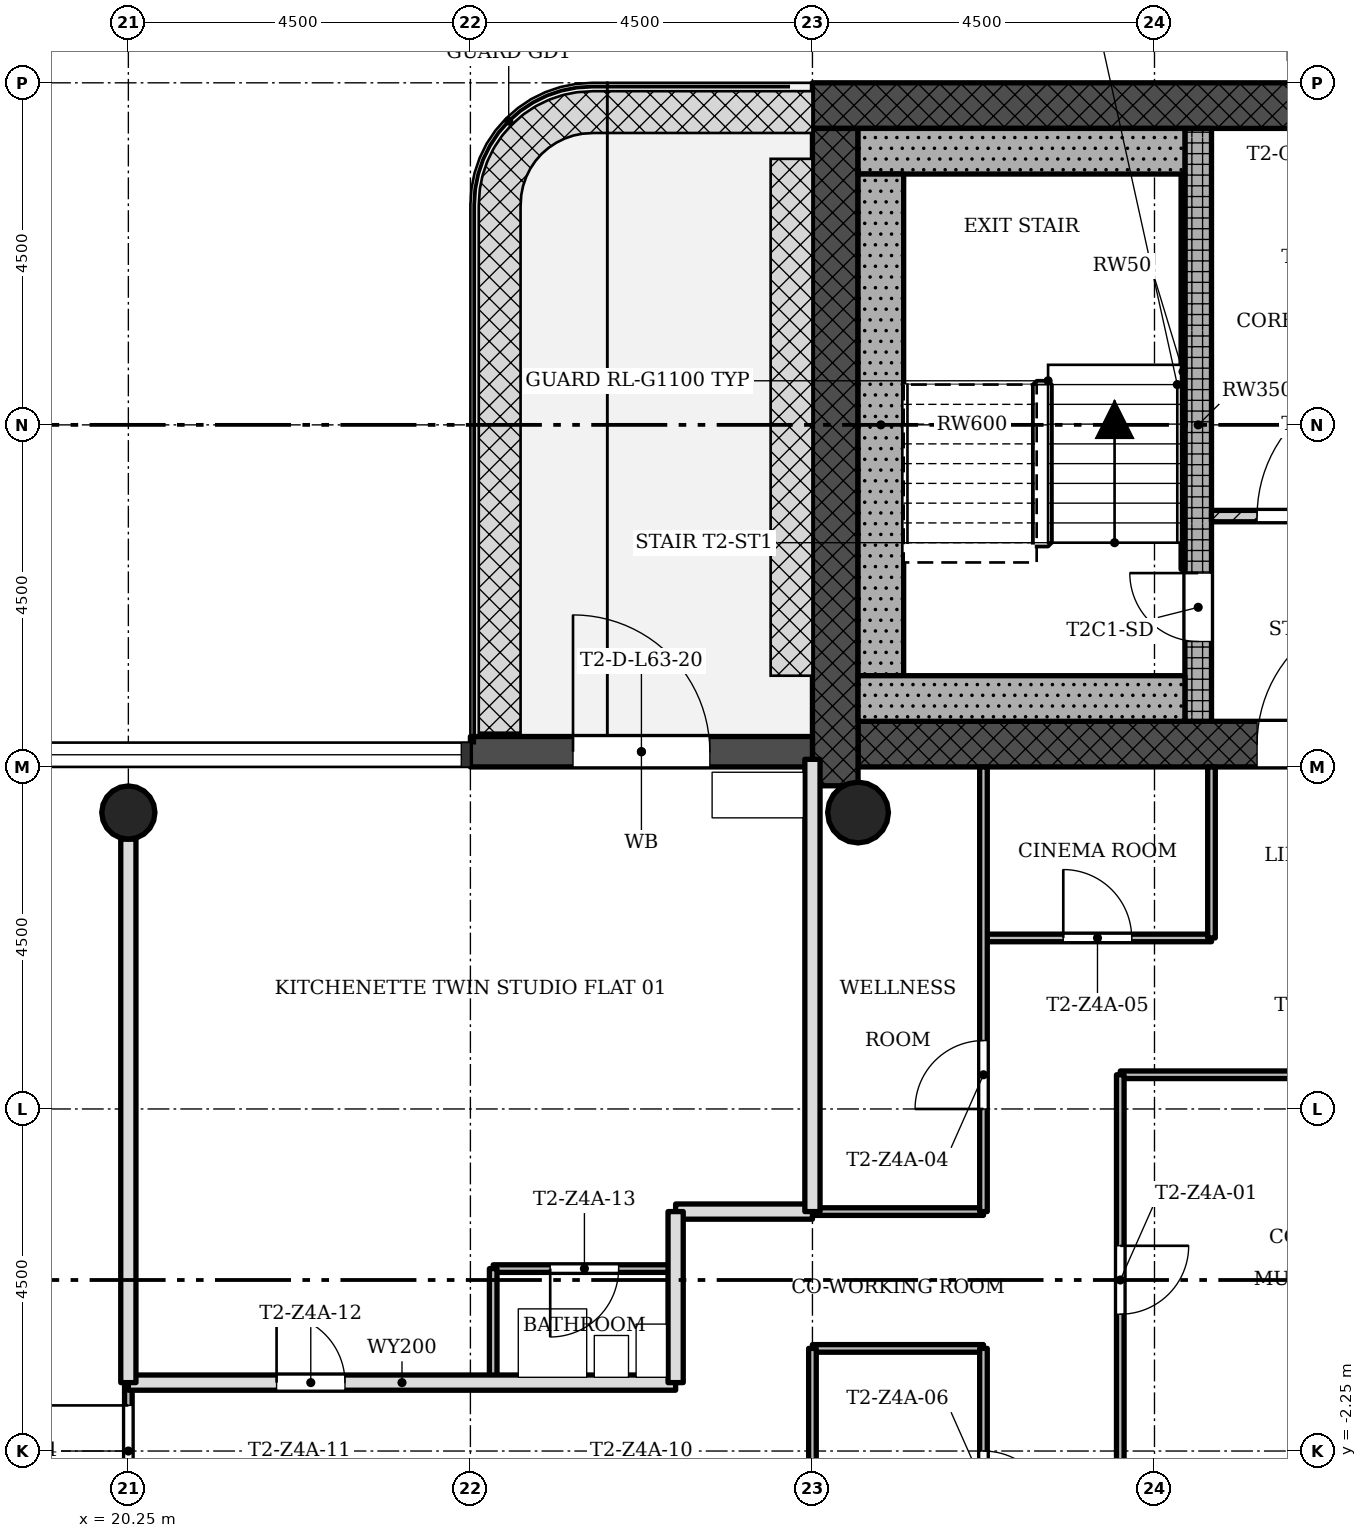
"""IFC4 building model, lengths in metres.
Left out: names, types, materials, properties, quantities, classifications, styles, units other than length and angle.
Written with IfcOpenShell. Run it as: python <this file> out.ifc"""

import sys

from ifc_helpers import new_model, si_unit, direction, frame, frame_2d, origin, origin_2d, place, context, subcontext, project, spatial, rectangle, hollow_circle, extrude, element, fill, save


model = new_model("IFC4")
c1 = context("Model", 3, precision=1e-05, world=origin(), true_north=direction((0.0, 1.0)))
c2 = subcontext(c1, "Body", "Model", "MODEL_VIEW")
j1 = project(units=[si_unit("LENGTHUNIT", "METRE"), si_unit("PLANEANGLEUNIT", "RADIAN")], contexts=[c1])
p1 = place(None, origin())
s1 = spatial("IfcSite", under=j1, at=p1, CompositionType="ELEMENT")
p2 = place(p1, origin())
s2 = spatial("IfcBuilding", under=s1, at=p2, CompositionType="ELEMENT")
p3 = place(p2, frame((0.0, 0.0, 226.6)))
s3 = spatial("IfcBuildingStorey", under=s2, at=p3, CompositionType="ELEMENT", Elevation=226.6)
p4 = place(p3, frame((29.85, 7.05, 0.0), z_axis=(0.0, 0.0, 1.0), x_axis=(1.0, 0.0, 0.0)))
e1 = element("IfcWall", 1, at=p4, inside=s3, PredefinedType="SHEAR", context=c2, shape_type="SweptSolid", body=[
    extrude(rectangle(XDim=12.9, YDim=0.6, at=frame_2d((6.45, 0.0))), origin(), (0.0, 0.0, 1.0), 3.4),
])
p5 = place(p4, frame((5.25, 0.0, 0.0)))
e2 = element("IfcOpeningElement", 2, at=p5, cuts=e1, PredefinedType="OPENING", context=c2, shape_type="SweptSolid", body=[
    extrude(rectangle(XDim=1.8, YDim=2.1, at=frame_2d((0.9, 1.05))), frame((0.0, 0.31, 0.0), z_axis=(0.0, -1.0, 0.0), x_axis=(1.0, 0.0, 0.0)), (0.0, 0.0, 1.0), 0.62),
])
p6 = place(p3, frame((42.15, 15.45, 0.0), z_axis=(0.0, 0.0, 1.0), x_axis=(-1.0, 0.0, 0.0)))
e3 = element("IfcWall", 3, at=p6, inside=s3, PredefinedType="SHEAR", context=c2, shape_type="SweptSolid", body=[
    extrude(rectangle(XDim=12.9, YDim=0.6, at=frame_2d((6.45, 0.0))), origin(), (0.0, 0.0, 1.0), 3.4),
])
p7 = place(p6, frame((5.7, 0.0, 0.45)))
e4 = element("IfcOpeningElement", 4, at=p7, cuts=e3, PredefinedType="OPENING", context=c2, shape_type="SweptSolid", body=[
    extrude(rectangle(XDim=0.9, YDim=2.4, at=frame_2d((0.45, 1.2))), frame((0.0, 0.31, 0.0), z_axis=(0.0, -1.0, 0.0), x_axis=(1.0, 0.0, 0.0)), (0.0, 0.0, 1.0), 0.62),
])
p8 = place(p3, frame((29.55, 15.15, 0.0), z_axis=(0.0, 0.0, 1.0), x_axis=(0.0, -1.0, 0.0)))
e5 = element("IfcWall", 5, at=p8, inside=s3, PredefinedType="SHEAR", context=c2, shape_type="SweptSolid", body=[
    extrude(rectangle(XDim=8.648, YDim=0.6, at=frame_2d((4.324, 0.0))), origin(), (0.0, 0.0, 1.0), 3.4),
])
p9 = place(p3, frame((34.325, 7.35, 0.0), z_axis=(0.0, 0.0, 1.0), x_axis=(0.0, 1.0, 0.0)))
e6 = element("IfcWall", 6, at=p9, inside=s3, PredefinedType="SHEAR", context=c2, shape_type="SweptSolid", body=[
    extrude(rectangle(XDim=7.8, YDim=0.35, at=frame_2d((3.9, 0.0))), origin(), (0.0, 0.0, 1.0), 3.4),
])
p10 = place(p9, frame((1.05, 0.0, 0.0)))
e7 = element("IfcOpeningElement", 7, at=p10, cuts=e6, PredefinedType="OPENING", context=c2, shape_type="SweptSolid", body=[
    extrude(rectangle(XDim=0.9, YDim=2.1, at=frame_2d((0.45, 1.05))), frame((0.0, 0.185, 0.0), z_axis=(0.0, -1.0, 0.0), x_axis=(1.0, 0.0, 0.0)), (0.0, 0.0, 1.0), 0.37),
])
p11 = place(p3, frame((20.25, 6.15, 0.0), z_axis=(0.0, 0.0, 1.0), x_axis=(1.0, 0.0, 0.0)))
e8 = element("IfcColumn", 8, at=p11, inside=s3, PredefinedType="COLUMN", context=c2, shape_type="SweptSolid", body=[
    extrude(hollow_circle(Radius=0.35, WallThickness=0.025, at=origin_2d()), origin(), (0.0, 0.0, 1.0), 3.4),
])
p12 = place(p3, frame((29.85, 6.15, 0.0), z_axis=(0.0, 0.0, 1.0), x_axis=(1.0, 0.0, 0.0)))
e9 = element("IfcColumn", 9, at=p12, inside=s3, PredefinedType="COLUMN", context=c2, shape_type="SweptSolid", body=[
    extrude(hollow_circle(Radius=0.4, WallThickness=0.028, at=origin_2d()), origin(), (0.0, 0.0, 1.0), 3.4),
])
p13 = place(p3, frame((29.25, 6.95, -0.02), z_axis=(0.0, 0.0, 1.0), x_axis=(-1.0, 0.0, 0.0)))
e10 = element("IfcWall", 10, at=p13, inside=s3, PredefinedType="STANDARD", context=c2, shape_type="SweptSolid", body=[
    extrude(rectangle(XDim=4.5, YDim=0.4, at=frame_2d((2.25, 0.0))), origin(), (0.0, 0.0, 1.0), 3.12),
])
p14 = place(p13, frame((1.35, 0.0, 0.02)))
e11 = element("IfcOpeningElement", 11, at=p14, cuts=e10, PredefinedType="OPENING", context=c2, shape_type="SweptSolid", body=[
    extrude(rectangle(XDim=1.8, YDim=2.1, at=frame_2d((0.9, 1.05))), frame((0.0, 0.21, 0.0), z_axis=(0.0, -1.0, 0.0), x_axis=(1.0, 0.0, 0.0)), (0.0, 0.0, 1.0), 0.42),
])
p15 = place(p3, frame((37.5, 10.05, 0.0), z_axis=(0.0, 0.0, 1.0), x_axis=(-1.0, 0.0, 0.0)))
e12 = element("IfcWall", 12, at=p15, inside=s3, PredefinedType="PARTITIONING", context=c2, shape_type="SweptSolid", body=[
    extrude(rectangle(XDim=3.0, YDim=0.15, at=frame_2d((1.5, 0.0))), origin(), (0.0, 0.0, 1.0), 3.0),
])
p16 = place(p15, frame((0.6, 0.0, 0.0)))
e13 = element("IfcOpeningElement", 13, at=p16, cuts=e12, PredefinedType="OPENING", context=c2, shape_type="SweptSolid", body=[
    extrude(rectangle(XDim=1.8, YDim=2.1, at=frame_2d((0.9, 1.05))), frame((0.0, 0.085, 0.0), z_axis=(0.0, -1.0, 0.0), x_axis=(1.0, 0.0, 0.0)), (0.0, 0.0, 1.0), 0.17),
])
p17 = place(p3, frame((27.45, -1.35, 0.0), z_axis=(0.0, 0.0, 1.0), x_axis=(-1.0, 0.0, 0.0)))
e14 = element("IfcWall", 14, at=p17, inside=s3, PredefinedType="SOLIDWALL", context=c2, shape_type="SweptSolid", body=[
    extrude(rectangle(XDim=7.2, YDim=0.2, at=frame_2d((3.6, 0.0))), origin(), (0.0, 0.0, 1.0), 3.0),
])
p18 = place(p17, frame((4.35, 0.0, 0.0)))
e15 = element("IfcOpeningElement", 15, at=p18, cuts=e14, PredefinedType="OPENING", context=c2, shape_type="SweptSolid", body=[
    extrude(rectangle(XDim=0.9, YDim=2.1, at=frame_2d((0.45, 1.05))), frame((0.0, 0.11, 0.0), z_axis=(0.0, -1.0, 0.0), x_axis=(1.0, 0.0, 0.0)), (0.0, 0.0, 1.0), 0.22),
])
p19 = place(p3, frame((31.5, -0.9, 0.0), z_axis=(0.0, 0.0, 1.0), x_axis=(-1.0, 0.0, 0.0)))
e16 = element("IfcWall", 16, at=p19, inside=s3, PredefinedType="PARTITIONING", context=c2, shape_type="SweptSolid", body=[
    extrude(rectangle(XDim=2.25, YDim=0.1, at=frame_2d((1.125, 0.0))), origin(), (0.0, 0.0, 1.0), 3.0),
])
p20 = place(p3, frame((27.45, 0.15, 0.0), z_axis=(0.0, 0.0, 1.0), x_axis=(-1.0, 0.0, 0.0)))
e17 = element("IfcWall", 17, at=p20, inside=s3, PredefinedType="PARTITIONING", context=c2, shape_type="SweptSolid", body=[
    extrude(rectangle(XDim=2.4, YDim=0.1, at=frame_2d((1.2, 0.0))), origin(), (0.0, 0.0, 1.0), 3.0),
])
p21 = place(p20, frame((0.75, 0.0, 0.0)))
e18 = element("IfcOpeningElement", 18, at=p21, cuts=e17, PredefinedType="OPENING", context=c2, shape_type="SweptSolid", body=[
    extrude(rectangle(XDim=0.9, YDim=2.1, at=frame_2d((0.45, 1.05))), frame((0.0, 0.06, 0.0), z_axis=(0.0, -1.0, 0.0), x_axis=(1.0, 0.0, 0.0)), (0.0, 0.0, 1.0), 0.12),
])
p22 = place(p3, frame((31.5, 0.9, 0.0), z_axis=(0.0, 0.0, 1.0), x_axis=(-1.0, 0.0, 0.0)))
e19 = element("IfcWall", 19, at=p22, inside=s3, PredefinedType="PARTITIONING", context=c2, shape_type="SweptSolid", body=[
    extrude(rectangle(XDim=2.25, YDim=0.1, at=frame_2d((1.125, 0.0))), origin(), (0.0, 0.0, 1.0), 3.0),
])
p23 = place(p3, frame((29.25, 0.9, 0.0), z_axis=(0.0, 0.0, 1.0), x_axis=(-1.0, 0.0, 0.0)))
e20 = element("IfcWall", 20, at=p23, inside=s3, PredefinedType="SOLIDWALL", context=c2, shape_type="SweptSolid", body=[
    extrude(rectangle(XDim=1.8, YDim=0.2, at=frame_2d((0.9, 0.0))), origin(), (0.0, 0.0, 1.0), 3.0),
])
p24 = place(p3, frame((38.7, 2.7, 0.0), z_axis=(0.0, 0.0, 1.0), x_axis=(-1.0, 0.0, 0.0)))
e21 = element("IfcWall", 21, at=p24, inside=s3, PredefinedType="PARTITIONING", context=c2, shape_type="SweptSolid", body=[
    extrude(rectangle(XDim=5.4, YDim=0.1, at=frame_2d((2.7, 0.0))), origin(), (0.0, 0.0, 1.0), 3.0),
])
p25 = place(p24, frame((2.25, 0.0, 0.0)))
e22 = element("IfcOpeningElement", 22, at=p25, cuts=e21, PredefinedType="OPENING", context=c2, shape_type="SweptSolid", body=[
    extrude(rectangle(XDim=0.9, YDim=2.1, at=frame_2d((0.45, 1.05))), frame((0.0, 0.06, 0.0), z_axis=(0.0, -1.0, 0.0), x_axis=(1.0, 0.0, 0.0)), (0.0, 0.0, 1.0), 0.12),
])
p26 = place(p3, frame((34.5, 4.5, 0.0), z_axis=(0.0, 0.0, 1.0), x_axis=(-1.0, 0.0, 0.0)))
e23 = element("IfcWall", 23, at=p26, inside=s3, PredefinedType="PARTITIONING", context=c2, shape_type="SweptSolid", body=[
    extrude(rectangle(XDim=3.0, YDim=0.1, at=frame_2d((1.5, 0.0))), origin(), (0.0, 0.0, 1.0), 3.0),
])
p27 = place(p26, frame((1.05, 0.0, 0.0)))
e24 = element("IfcOpeningElement", 24, at=p27, cuts=e23, PredefinedType="OPENING", context=c2, shape_type="SweptSolid", body=[
    extrude(rectangle(XDim=0.9, YDim=2.1, at=frame_2d((0.45, 1.05))), frame((0.0, 0.06, 0.0), z_axis=(0.0, -1.0, 0.0), x_axis=(1.0, 0.0, 0.0)), (0.0, 0.0, 1.0), 0.12),
])
p28 = place(p3, frame((34.5, 4.5, 0.0), z_axis=(0.0, 0.0, 1.0), x_axis=(0.0, 1.0, 0.0)))
e25 = element("IfcWall", 25, at=p28, inside=s3, PredefinedType="PARTITIONING", context=c2, shape_type="SweptSolid", body=[
    extrude(rectangle(XDim=2.25, YDim=0.1, at=frame_2d((1.125, 0.0))), origin(), (0.0, 0.0, 1.0), 3.0),
])
p29 = place(p3, frame((33.3, -2.7, 0.0), z_axis=(0.0, 0.0, 1.0), x_axis=(0.0, 1.0, 0.0)))
e26 = element("IfcWall", 26, at=p29, inside=s3, PredefinedType="PARTITIONING", context=c2, shape_type="SweptSolid", body=[
    extrude(rectangle(XDim=5.4, YDim=0.1, at=frame_2d((2.7, 0.0))), origin(), (0.0, 0.0, 1.0), 3.0),
])
p30 = place(p29, frame((2.25, 0.0, 0.0)))
e27 = element("IfcOpeningElement", 27, at=p30, cuts=e26, PredefinedType="OPENING", context=c2, shape_type="SweptSolid", body=[
    extrude(rectangle(XDim=0.9, YDim=2.1, at=frame_2d((0.45, 1.05))), frame((0.0, 0.06, 0.0), z_axis=(0.0, -1.0, 0.0), x_axis=(1.0, 0.0, 0.0)), (0.0, 0.0, 1.0), 0.12),
])
p31 = place(p3, frame((31.5, -4.5, 0.0), z_axis=(0.0, 0.0, 1.0), x_axis=(0.0, 1.0, 0.0)))
e28 = element("IfcWall", 28, at=p31, inside=s3, PredefinedType="PARTITIONING", context=c2, shape_type="SweptSolid", body=[
    extrude(rectangle(XDim=3.6, YDim=0.1, at=frame_2d((1.8, 0.0))), origin(), (0.0, 0.0, 1.0), 3.0),
])
p32 = place(p31, frame((1.35, 0.0, 0.0)))
e29 = element("IfcOpeningElement", 29, at=p32, cuts=e28, PredefinedType="OPENING", context=c2, shape_type="SweptSolid", body=[
    extrude(rectangle(XDim=0.9, YDim=2.1, at=frame_2d((0.45, 1.05))), frame((0.0, 0.06, 0.0), z_axis=(0.0, -1.0, 0.0), x_axis=(1.0, 0.0, 0.0)), (0.0, 0.0, 1.0), 0.12),
])
p33 = place(p3, frame((31.5, 0.9, 0.0), z_axis=(0.0, 0.0, 1.0), x_axis=(0.0, 1.0, 0.0)))
e30 = element("IfcWall", 30, at=p33, inside=s3, PredefinedType="PARTITIONING", context=c2, shape_type="SweptSolid", body=[
    extrude(rectangle(XDim=5.85, YDim=0.1, at=frame_2d((2.925, 0.0))), origin(), (0.0, 0.0, 1.0), 3.0),
])
p34 = place(p33, frame((1.35, 0.0, 0.0)))
e31 = element("IfcOpeningElement", 31, at=p34, cuts=e30, PredefinedType="OPENING", context=c2, shape_type="SweptSolid", body=[
    extrude(rectangle(XDim=0.9, YDim=2.1, at=frame_2d((0.45, 1.05))), frame((0.0, 0.06, 0.0), z_axis=(0.0, -1.0, 0.0), x_axis=(1.0, 0.0, 0.0)), (0.0, 0.0, 1.0), 0.12),
])
p35 = place(p3, frame((29.25, -6.85, 0.0), z_axis=(0.0, 0.0, 1.0), x_axis=(0.0, 1.0, 0.0)))
e32 = element("IfcWall", 32, at=p35, inside=s3, PredefinedType="PARTITIONING", context=c2, shape_type="SweptSolid", body=[
    extrude(rectangle(XDim=5.95, YDim=0.1, at=frame_2d((2.975, 0.0))), origin(), (0.0, 0.0, 1.0), 3.0),
])
p36 = place(p3, frame((29.25, 0.9, 0.0), z_axis=(0.0, 0.0, 1.0), x_axis=(0.0, 1.0, 0.0)))
e33 = element("IfcWall", 33, at=p36, inside=s3, PredefinedType="SOLIDWALL", context=c2, shape_type="SweptSolid", body=[
    extrude(rectangle(XDim=5.95, YDim=0.2, at=frame_2d((2.975, 0.0))), origin(), (0.0, 0.0, 1.0), 3.0),
])
p37 = place(p3, frame((27.45, -1.35, 0.0), z_axis=(0.0, 0.0, 1.0), x_axis=(0.0, 1.0, 0.0)))
e34 = element("IfcWall", 34, at=p37, inside=s3, PredefinedType="SOLIDWALL", context=c2, shape_type="SweptSolid", body=[
    extrude(rectangle(XDim=2.25, YDim=0.2, at=frame_2d((1.125, 0.0))), origin(), (0.0, 0.0, 1.0), 3.0),
])
p38 = place(p3, frame((25.05, -1.35, 0.0), z_axis=(0.0, 0.0, 1.0), x_axis=(0.0, 1.0, 0.0)))
e35 = element("IfcWall", 35, at=p38, inside=s3, PredefinedType="PARTITIONING", context=c2, shape_type="SweptSolid", body=[
    extrude(rectangle(XDim=1.5, YDim=0.1, at=frame_2d((0.75, 0.0))), origin(), (0.0, 0.0, 1.0), 3.0),
])
p39 = place(p3, frame((20.25, -5.8, 0.0), z_axis=(0.0, 0.0, 1.0), x_axis=(0.0, 1.0, 0.0)))
e36 = element("IfcWall", 36, at=p39, inside=s3, PredefinedType="PARTITIONING", context=c2, shape_type="SweptSolid", body=[
    extrude(rectangle(XDim=4.45, YDim=0.1, at=frame_2d((2.225, 0.0))), origin(), (0.0, 0.0, 1.0), 3.0),
])
p40 = place(p39, frame((2.95, 0.0, 0.0)))
e37 = element("IfcOpeningElement", 37, at=p40, cuts=e36, PredefinedType="OPENING", context=c2, shape_type="SweptSolid", body=[
    extrude(rectangle(XDim=1.2, YDim=2.1, at=frame_2d((0.6, 1.05))), frame((0.0, 0.06, 0.0), z_axis=(0.0, -1.0, 0.0), x_axis=(1.0, 0.0, 0.0)), (0.0, 0.0, 1.0), 0.12),
])
p41 = place(p3, frame((20.25, -1.35, 0.0), z_axis=(0.0, 0.0, 1.0), x_axis=(0.0, 1.0, 0.0)))
e38 = element("IfcWall", 38, at=p41, inside=s3, PredefinedType="SOLIDWALL", context=c2, shape_type="SweptSolid", body=[
    extrude(rectangle(XDim=7.15, YDim=0.2, at=frame_2d((3.575, 0.0))), origin(), (0.0, 0.0, 1.0), 3.0),
])
p42 = place(p3, frame((34.15, 14.85, 0.0), z_axis=(0.0, 0.0, 1.0), x_axis=(-1.0, 0.0, 0.0)))
e39 = element("IfcWall", 39, at=p42, inside=s3, PredefinedType="SHEAR", context=c2, shape_type="SweptSolid", body=[
    extrude(rectangle(XDim=4.3, YDim=0.6, at=frame_2d((2.15, 0.0))), origin(), (0.0, 0.0, 1.0), 3.4),
])
p43 = place(p3, frame((30.15, 7.95, 0.0), z_axis=(0.0, 0.0, 1.0), x_axis=(0.0, 1.0, 0.0)))
e40 = element("IfcWall", 40, at=p43, inside=s3, PredefinedType="SHEAR", context=c2, shape_type="SweptSolid", body=[
    extrude(rectangle(XDim=6.6, YDim=0.6, at=frame_2d((3.3, 0.0))), origin(), (0.0, 0.0, 1.0), 3.4),
])
p44 = place(p3, frame((34.15, 7.65, 0.0), z_axis=(0.0, 0.0, 1.0), x_axis=(-1.0, 0.0, 0.0)))
e41 = element("IfcWall", 41, at=p44, inside=s3, PredefinedType="SHEAR", context=c2, shape_type="SweptSolid", body=[
    extrude(rectangle(XDim=4.3, YDim=0.6, at=frame_2d((2.15, 0.0))), origin(), (0.0, 0.0, 1.0), 3.4),
])
p45 = place(p3, frame((34.125, 9.35, 0.0), z_axis=(0.0, 0.0, 1.0), x_axis=(0.0, 1.0, 0.0)))
e42 = element("IfcWall", 42, at=p45, inside=s3, PredefinedType="SHEAR", context=c2, shape_type="SweptSolid", body=[
    extrude(rectangle(XDim=5.2, YDim=0.05, at=frame_2d((2.6, 0.0))), origin(), (0.0, 0.0, 1.0), 3.4),
])
p46 = place(p14, origin())
e43 = element("IfcDoor", 43, at=p46, inside=s3, OperationType="SINGLE_SWING_RIGHT", PredefinedType="DOOR", context=c2, shape_type="SweptSolid", body=[
    extrude(rectangle(XDim=1.8, YDim=2.1, at=frame_2d((0.9, 1.05))), frame((0.0, 0.025, 0.0), z_axis=(0.0, -1.0, 0.0), x_axis=(1.0, 0.0, 0.0)), (0.0, 0.0, 1.0), 0.05),
])
fill(e11, e43)
p47 = place(p16, origin())
e44 = element("IfcDoor", 44, at=p47, inside=s3, OperationType="SINGLE_SWING_LEFT", PredefinedType="DOOR", context=c2, shape_type="SweptSolid", body=[
    extrude(rectangle(XDim=1.8, YDim=2.1, at=frame_2d((0.9, 1.05))), frame((0.0, 0.025, 0.0), z_axis=(0.0, -1.0, 0.0), x_axis=(1.0, 0.0, 0.0)), (0.0, 0.0, 1.0), 0.05),
])
fill(e13, e44)
p48 = place(p30, origin())
e45 = element("IfcDoor", 45, at=p48, inside=s3, OperationType="SINGLE_SWING_RIGHT", PredefinedType="DOOR", context=c2, shape_type="SweptSolid", body=[
    extrude(rectangle(XDim=0.9, YDim=2.1, at=frame_2d((0.45, 1.05))), frame((0.0, 0.025, 0.0), z_axis=(0.0, -1.0, 0.0), x_axis=(1.0, 0.0, 0.0)), (0.0, 0.0, 1.0), 0.05),
])
fill(e27, e45)
p49 = place(p34, origin())
e46 = element("IfcDoor", 46, at=p49, inside=s3, OperationType="SINGLE_SWING_RIGHT", PredefinedType="DOOR", context=c2, shape_type="SweptSolid", body=[
    extrude(rectangle(XDim=0.9, YDim=2.1, at=frame_2d((0.45, 1.05))), frame((0.0, 0.025, 0.0), z_axis=(0.0, -1.0, 0.0), x_axis=(1.0, 0.0, 0.0)), (0.0, 0.0, 1.0), 0.05),
])
fill(e31, e46)
p50 = place(p27, origin())
e47 = element("IfcDoor", 47, at=p50, inside=s3, OperationType="SINGLE_SWING_RIGHT", PredefinedType="DOOR", context=c2, shape_type="SweptSolid", body=[
    extrude(rectangle(XDim=0.9, YDim=2.1, at=frame_2d((0.45, 1.05))), frame((0.0, 0.025, 0.0), z_axis=(0.0, -1.0, 0.0), x_axis=(1.0, 0.0, 0.0)), (0.0, 0.0, 1.0), 0.05),
])
fill(e24, e47)
p51 = place(p32, origin())
e48 = element("IfcDoor", 48, at=p51, inside=s3, OperationType="SINGLE_SWING_LEFT", PredefinedType="DOOR", context=c2, shape_type="SweptSolid", body=[
    extrude(rectangle(XDim=0.9, YDim=2.1, at=frame_2d((0.45, 1.05))), frame((0.0, 0.025, 0.0), z_axis=(0.0, -1.0, 0.0), x_axis=(1.0, 0.0, 0.0)), (0.0, 0.0, 1.0), 0.05),
])
fill(e29, e48)
p52 = place(p18, origin())
e49 = element("IfcDoor", 49, at=p52, inside=s3, OperationType="SINGLE_SWING_RIGHT", PredefinedType="DOOR", context=c2, shape_type="SweptSolid", body=[
    extrude(rectangle(XDim=0.9, YDim=2.1, at=frame_2d((0.45, 1.05))), frame((0.0, 0.025, 0.0), z_axis=(0.0, -1.0, 0.0), x_axis=(1.0, 0.0, 0.0)), (0.0, 0.0, 1.0), 0.05),
])
fill(e15, e49)
p53 = place(p21, origin())
e50 = element("IfcDoor", 50, at=p53, inside=s3, OperationType="SINGLE_SWING_LEFT", PredefinedType="DOOR", context=c2, shape_type="SweptSolid", body=[
    extrude(rectangle(XDim=0.9, YDim=2.1, at=frame_2d((0.45, 1.05))), frame((0.0, 0.025, 0.0), z_axis=(0.0, -1.0, 0.0), x_axis=(1.0, 0.0, 0.0)), (0.0, 0.0, 1.0), 0.05),
])
fill(e18, e50)
p54 = place(p40, origin())
e51 = element("IfcDoor", 51, at=p54, inside=s3, OperationType="SINGLE_SWING_LEFT", PredefinedType="DOOR", context=c2, shape_type="SweptSolid", body=[
    extrude(rectangle(XDim=1.2, YDim=2.1, at=frame_2d((0.6, 1.05))), frame((0.0, 0.025, 0.0), z_axis=(0.0, -1.0, 0.0), x_axis=(1.0, 0.0, 0.0)), (0.0, 0.0, 1.0), 0.05),
])
fill(e37, e51)
p55 = place(p10, origin())
e52 = element("IfcDoor", 52, at=p55, inside=s3, OperationType="SINGLE_SWING_LEFT", PredefinedType="DOOR", context=c2, shape_type="SweptSolid", body=[
    extrude(rectangle(XDim=0.9, YDim=2.1, at=frame_2d((0.45, 1.05))), frame((0.0, 0.025, 0.0), z_axis=(0.0, -1.0, 0.0), x_axis=(1.0, 0.0, 0.0)), (0.0, 0.0, 1.0), 0.05),
])
fill(e7, e52)
p56 = place(p5, origin())
e53 = element("IfcDoor", 53, at=p56, inside=s3, OperationType="SINGLE_SWING_LEFT", PredefinedType="DOOR", context=c2, shape_type="SweptSolid", body=[
    extrude(rectangle(XDim=1.8, YDim=2.1, at=frame_2d((0.9, 1.05))), frame((0.0, 0.025, 0.0), z_axis=(0.0, -1.0, 0.0), x_axis=(1.0, 0.0, 0.0)), (0.0, 0.0, 1.0), 0.05),
])
fill(e2, e53)
save(model, sys.argv[1])
